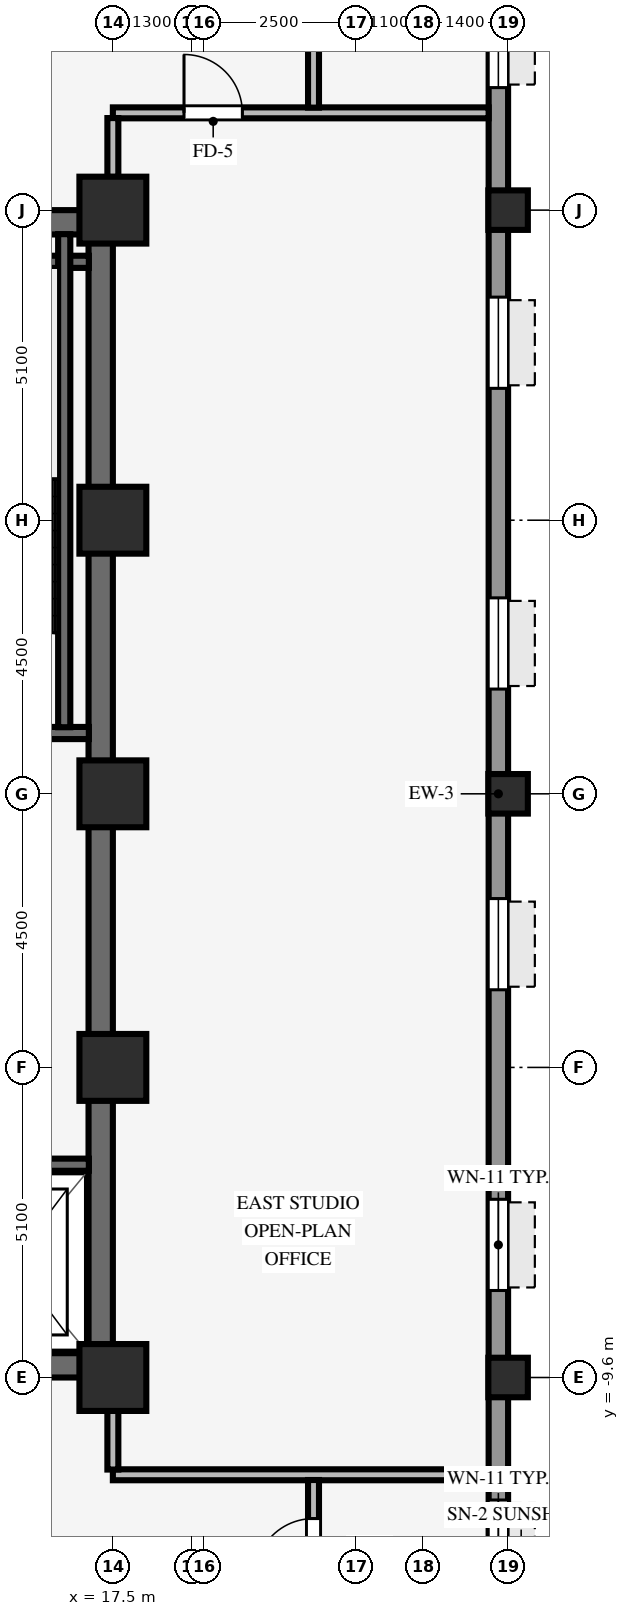
"""IFC4 building model, lengths in metres.
Left out: names, types, materials, properties, quantities, classifications, styles, units other than length and angle.
Written with IfcOpenShell. Run it as: python <this file> out.ifc"""

import sys

from ifc_helpers import new_model, si_unit, direction, frame, frame_2d, origin, origin_2d, place, context, subcontext, project, spatial, rectangle, hollow_rectangle, extrude, source, transform, mapped, element, fill, save


model = new_model("IFC4")
c1 = context("Model", 3, precision=1e-05, world=origin(), true_north=direction((0.0, 1.0)))
c2 = subcontext(c1, "Body", "Model", "MODEL_VIEW")
j1 = project(units=[si_unit("LENGTHUNIT", "METRE"), si_unit("PLANEANGLEUNIT", "RADIAN")], contexts=[c1])
p1 = place(None, origin())
s1 = spatial("IfcSite", under=j1, at=p1, CompositionType="ELEMENT")
p2 = place(p1, origin())
s2 = spatial("IfcBuilding", under=s1, at=p2, CompositionType="ELEMENT")
p3 = place(p2, frame((0.0, 0.0, 101.95)))
s3 = spatial("IfcBuildingStorey", under=s2, at=p3, CompositionType="ELEMENT", Elevation=101.95)
for number, where, z_axis, x_axis in (
    (1, (9.0, -9.4, 0.0), (0.0, 0.0, 1.0), (1.0, 0.0, 0.0)),
    (2, (9.0, 9.4, 0.0), (0.0, 0.0, 1.0), (1.0, 0.0, 0.0)),
):
    element("IfcWall", number, at=place(p3, frame(where, z_axis=z_axis, x_axis=x_axis)), inside=s3, PredefinedType="SHEAR", context=c2, shape_type="SweptSolid", body=[
        extrude(rectangle(XDim=8.5, YDim=0.4, at=frame_2d((4.25, 0.0))), origin(), (0.0, 0.0, 1.0), 3.37),
    ])
p4 = place(p3, frame((17.3, -9.205, 0.0), z_axis=(0.0, 0.0, 1.0), x_axis=(0.0, 1.0, 0.0)))
e3 = element("IfcWall", 3, at=p4, inside=s3, PredefinedType="SHEAR", context=c2, shape_type="SweptSolid", body=[
    extrude(rectangle(XDim=18.41, YDim=0.4, at=frame_2d((9.205, 0.0))), origin(), (0.0, 0.0, 1.0), 3.37),
])
for number, where, z_axis, x_axis in (
    (4, (17.5, -9.6, 0.0), (0.0, 0.0, 1.0), (1.0, 0.0, 0.0)),
    (5, (17.5, -4.5, 0.0), (0.0, 0.0, 1.0), (1.0, 0.0, 0.0)),
    (6, (17.5, 4.5, 0.0), (0.0, 0.0, 1.0), (1.0, 0.0, 0.0)),
    (7, (17.5, 9.6, 0.0), (0.0, 0.0, 1.0), (1.0, 0.0, 0.0)),
    (8, (17.5, 0.0, 0.0), (0.0, 0.0, 1.0), (1.0, 0.0, 0.0)),
):
    element("IfcColumn", number, at=place(p3, frame(where, z_axis=z_axis, x_axis=x_axis)), inside=s3, PredefinedType="COLUMN", context=c2, shape_type="SweptSolid", body=[
        extrude(rectangle(XDim=1.1, YDim=1.1, at=origin_2d()), origin(), (0.0, 0.0, 1.0), 3.37),
    ])
for number, where, z_axis, x_axis in (
    (9, (24.0, -9.6, 0.0), (0.0, 0.0, 1.0), (1.0, 0.0, 0.0)),
    (10, (24.0, 0.0, 0.0), (0.0, 0.0, 1.0), (1.0, 0.0, 0.0)),
    (11, (24.0, 9.6, 0.0), (0.0, 0.0, 1.0), (1.0, 0.0, 0.0)),
):
    element("IfcColumn", number, at=place(p3, frame(where, z_axis=z_axis, x_axis=x_axis)), inside=s3, PredefinedType="COLUMN", context=c2, shape_type="SweptSolid", body=[
        extrude(hollow_rectangle(XDim=0.65, YDim=0.65, WallThickness=0.04, InnerFilletRadius=0.04, OuterFilletRadius=0.08, at=origin_2d()), origin(), (0.0, 0.0, 1.0), 3.37),
    ])
p5 = place(p3, frame((23.84, -20.784, 0.0), z_axis=(0.0, 0.0, 1.0), x_axis=(0.0, 1.0, 0.0)))
e12 = element("IfcWall", 12, at=p5, inside=s3, PredefinedType="STANDARD", context=c2, shape_type="SweptSolid", body=[
    extrude(rectangle(XDim=41.568, YDim=0.32, at=frame_2d((20.784, 0.0))), origin(), (0.0, 0.0, 1.0), 2.705),
])
p6 = place(p5, frame((1.373, 0.0, 0.8)))
e13 = element("IfcOpeningElement", 13, at=p6, cuts=e12, PredefinedType="OPENING", context=c2, shape_type="SweptSolid", body=[
    extrude(rectangle(XDim=1.5, YDim=1.6, at=frame_2d((0.75, 0.8))), frame((0.0, 0.17, 0.0), z_axis=(0.0, -1.0, 0.0), x_axis=(1.0, 0.0, 0.0)), (0.0, 0.0, 1.0), 0.34),
])
p7 = place(p5, frame((7.669, 0.0, 0.8)))
e14 = element("IfcOpeningElement", 14, at=p7, cuts=e12, PredefinedType="OPENING", context=c2, shape_type="SweptSolid", body=[
    extrude(rectangle(XDim=1.5, YDim=1.6, at=frame_2d((0.75, 0.8))), frame((0.0, 0.17, 0.0), z_axis=(0.0, -1.0, 0.0), x_axis=(1.0, 0.0, 0.0)), (0.0, 0.0, 1.0), 0.34),
])
p8 = place(p5, frame((12.615, 0.0, 0.8)))
e15 = element("IfcOpeningElement", 15, at=p8, cuts=e12, PredefinedType="OPENING", context=c2, shape_type="SweptSolid", body=[
    extrude(rectangle(XDim=1.5, YDim=1.6, at=frame_2d((0.75, 0.8))), frame((0.0, 0.17, 0.0), z_axis=(0.0, -1.0, 0.0), x_axis=(1.0, 0.0, 0.0)), (0.0, 0.0, 1.0), 0.34),
])
p9 = place(p5, frame((17.561, 0.0, 0.8)))
e16 = element("IfcOpeningElement", 16, at=p9, cuts=e12, PredefinedType="OPENING", context=c2, shape_type="SweptSolid", body=[
    extrude(rectangle(XDim=1.5, YDim=1.6, at=frame_2d((0.75, 0.8))), frame((0.0, 0.17, 0.0), z_axis=(0.0, -1.0, 0.0), x_axis=(1.0, 0.0, 0.0)), (0.0, 0.0, 1.0), 0.34),
])
p10 = place(p5, frame((22.507, 0.0, 0.8)))
e17 = element("IfcOpeningElement", 17, at=p10, cuts=e12, PredefinedType="OPENING", context=c2, shape_type="SweptSolid", body=[
    extrude(rectangle(XDim=1.5, YDim=1.6, at=frame_2d((0.75, 0.8))), frame((0.0, 0.17, 0.0), z_axis=(0.0, -1.0, 0.0), x_axis=(1.0, 0.0, 0.0)), (0.0, 0.0, 1.0), 0.34),
])
p11 = place(p5, frame((27.453, 0.0, 0.8)))
e18 = element("IfcOpeningElement", 18, at=p11, cuts=e12, PredefinedType="OPENING", context=c2, shape_type="SweptSolid", body=[
    extrude(rectangle(XDim=1.5, YDim=1.6, at=frame_2d((0.75, 0.8))), frame((0.0, 0.17, 0.0), z_axis=(0.0, -1.0, 0.0), x_axis=(1.0, 0.0, 0.0)), (0.0, 0.0, 1.0), 0.34),
])
p12 = place(p5, frame((32.399, 0.0, 0.8)))
e19 = element("IfcOpeningElement", 19, at=p12, cuts=e12, PredefinedType="OPENING", context=c2, shape_type="SweptSolid", body=[
    extrude(rectangle(XDim=1.5, YDim=1.6, at=frame_2d((0.75, 0.8))), frame((0.0, 0.17, 0.0), z_axis=(0.0, -1.0, 0.0), x_axis=(1.0, 0.0, 0.0)), (0.0, 0.0, 1.0), 0.34),
])
p13 = place(p5, frame((38.695, 0.0, 0.8)))
e20 = element("IfcOpeningElement", 20, at=p13, cuts=e12, PredefinedType="OPENING", context=c2, shape_type="SweptSolid", body=[
    extrude(rectangle(XDim=1.5, YDim=1.6, at=frame_2d((0.75, 0.8))), frame((0.0, 0.17, 0.0), z_axis=(0.0, -1.0, 0.0), x_axis=(1.0, 0.0, 0.0)), (0.0, 0.0, 1.0), 0.34),
])
for number, where, z_axis, x_axis in (
    (21, (13.535, 1.0, 0.0), (0.0, 0.0, 1.0), (1.0, 0.0, 0.0)),
    (22, (13.535, 8.75, 0.0), (0.0, 0.0, 1.0), (1.0, 0.0, 0.0)),
):
    element("IfcWall", number, at=place(p3, frame(where, z_axis=z_axis, x_axis=x_axis)), inside=s3, PredefinedType="SHEAR", context=c2, shape_type="SweptSolid", body=[
        extrude(rectangle(XDim=3.57, YDim=0.2, at=frame_2d((1.785, 0.0))), origin(), (0.0, 0.0, 1.0), 3.37),
    ])
p14 = place(p3, frame((16.7, 1.095, 0.0), z_axis=(0.0, 0.0, 1.0), x_axis=(0.0, 1.0, 0.0)))
e23 = element("IfcWall", 23, at=p14, inside=s3, PredefinedType="SHEAR", context=c2, shape_type="SweptSolid", body=[
    extrude(rectangle(XDim=8.11, YDim=0.2, at=frame_2d((4.055, 0.0))), origin(), (0.0, 0.0, 1.0), 3.37),
])
p15 = place(p3, frame((14.645, -6.1, 0.0), z_axis=(0.0, 0.0, 1.0), x_axis=(1.0, 0.0, 0.0)))
e24 = element("IfcWall", 24, at=p15, inside=s3, PredefinedType="SHEAR", context=c2, shape_type="SweptSolid", body=[
    extrude(rectangle(XDim=2.46, YDim=0.2, at=frame_2d((1.23, 0.0))), origin(), (0.0, 0.0, 1.0), 3.37),
])
p16 = place(p3, frame((17.5, -11.2, 0.0), z_axis=(0.0, 0.0, 1.0), x_axis=(1.0, 0.0, 0.0)))
e25 = element("IfcWall", 25, at=p16, inside=s3, PredefinedType="PARTITIONING", context=c2, shape_type="SweptSolid", body=[
    extrude(rectangle(XDim=6.18, YDim=0.18, at=frame_2d((3.09, 0.0))), origin(), (0.0, 0.0, 1.0), 3.36),
])
p17 = place(p3, frame((17.5, 11.2, 0.0), z_axis=(0.0, 0.0, 1.0), x_axis=(1.0, 0.0, 0.0)))
e26 = element("IfcWall", 26, at=p17, inside=s3, PredefinedType="PARTITIONING", context=c2, shape_type="SweptSolid", body=[
    extrude(rectangle(XDim=6.18, YDim=0.18, at=frame_2d((3.09, 0.0))), origin(), (0.0, 0.0, 1.0), 3.36),
])
p18 = place(p17, frame((1.17, 0.0, 0.0)))
e27 = element("IfcOpeningElement", 27, at=p18, cuts=e26, PredefinedType="OPENING", context=c2, shape_type="SweptSolid", body=[
    extrude(rectangle(XDim=0.96, YDim=2.1, at=frame_2d((0.48, 1.05))), frame((0.0, 0.1, 0.0), z_axis=(0.0, -1.0, 0.0), x_axis=(1.0, 0.0, 0.0)), (0.0, 0.0, 1.0), 0.2),
])
for number, where, z_axis, x_axis in (
    (28, (17.5, -11.114, 0.0), (0.0, 0.0, 1.0), (0.0, 1.0, 0.0)),
    (29, (17.5, 10.146, 0.0), (0.0, 0.0, 1.0), (0.0, 1.0, 0.0)),
):
    element("IfcWall", number, at=place(p3, frame(where, z_axis=z_axis, x_axis=x_axis)), inside=s3, PredefinedType="PARTITIONING", context=c2, shape_type="SweptSolid", body=[
        extrude(rectangle(XDim=0.968, YDim=0.18, at=frame_2d((0.484, 0.0))), origin(), (0.0, 0.0, 1.0), 2.738),
    ])
p19 = place(p3, frame((20.8, -13.514, 0.0), z_axis=(0.0, 0.0, 1.0), x_axis=(0.0, 1.0, 0.0)))
e30 = element("IfcWall", 30, at=p19, inside=s3, PredefinedType="PARTITIONING", context=c2, shape_type="SweptSolid", body=[
    extrude(rectangle(XDim=2.228, YDim=0.18, at=frame_2d((1.114, 0.0))), origin(), (0.0, 0.0, 1.0), 3.36),
])
p20 = place(p19, frame((0.634, 0.0, 0.0)))
e31 = element("IfcOpeningElement", 31, at=p20, cuts=e30, PredefinedType="OPENING", context=c2, shape_type="SweptSolid", body=[
    extrude(rectangle(XDim=0.96, YDim=2.1, at=frame_2d((0.48, 1.05))), frame((0.0, 0.1, 0.0), z_axis=(0.0, -1.0, 0.0), x_axis=(1.0, 0.0, 0.0)), (0.0, 0.0, 1.0), 0.2),
])
p21 = place(p3, frame((20.8, 11.286, 0.0), z_axis=(0.0, 0.0, 1.0), x_axis=(0.0, 1.0, 0.0)))
e32 = element("IfcWall", 32, at=p21, inside=s3, PredefinedType="PARTITIONING", context=c2, shape_type="SweptSolid", body=[
    extrude(rectangle(XDim=2.228, YDim=0.18, at=frame_2d((1.114, 0.0))), origin(), (0.0, 0.0, 1.0), 3.36),
])
m1 = source(origin(), c2, "Body", "SweptSolid", [
    extrude(rectangle(XDim=1.5, YDim=1.6, at=frame_2d((0.75, 0.8))), frame((0.0, 0.03, 0.0), z_axis=(0.0, -1.0, 0.0), x_axis=(1.0, 0.0, 0.0)), (0.0, 0.0, 1.0), 0.06),
])
p22 = place(p7, origin())
e33 = element("IfcWindow", 33, at=p22, inside=s3, PartitioningType="SINGLE_PANEL", PredefinedType="WINDOW", context=c2, shape_type="MappedRepresentation", body=[
    mapped(m1, transform((0.0, 0.0, 0.0), scale=1.0)),
])
fill(e14, e33)
p23 = place(p8, origin())
e34 = element("IfcWindow", 34, at=p23, inside=s3, PartitioningType="SINGLE_PANEL", PredefinedType="WINDOW", context=c2, shape_type="MappedRepresentation", body=[
    mapped(m1, transform((0.0, 0.0, 0.0), scale=1.0)),
])
fill(e15, e34)
p24 = place(p9, origin())
e35 = element("IfcWindow", 35, at=p24, inside=s3, PartitioningType="SINGLE_PANEL", PredefinedType="WINDOW", context=c2, shape_type="MappedRepresentation", body=[
    mapped(m1, transform((0.0, 0.0, 0.0), scale=1.0)),
])
fill(e16, e35)
p25 = place(p10, origin())
e36 = element("IfcWindow", 36, at=p25, inside=s3, PartitioningType="SINGLE_PANEL", PredefinedType="WINDOW", context=c2, shape_type="MappedRepresentation", body=[
    mapped(m1, transform((0.0, 0.0, 0.0), scale=1.0)),
])
fill(e17, e36)
p26 = place(p11, origin())
e37 = element("IfcWindow", 37, at=p26, inside=s3, PartitioningType="SINGLE_PANEL", PredefinedType="WINDOW", context=c2, shape_type="MappedRepresentation", body=[
    mapped(m1, transform((0.0, 0.0, 0.0), scale=1.0)),
])
fill(e18, e37)
p27 = place(p12, origin())
e38 = element("IfcWindow", 38, at=p27, inside=s3, PartitioningType="SINGLE_PANEL", PredefinedType="WINDOW", context=c2, shape_type="MappedRepresentation", body=[
    mapped(m1, transform((0.0, 0.0, 0.0), scale=1.0)),
])
fill(e19, e38)
m2 = source(origin(), c2, "Body", "SweptSolid", [
    extrude(rectangle(XDim=0.96, YDim=2.1, at=frame_2d((0.48, 1.05))), frame((0.0, 0.025, 0.0), z_axis=(0.0, -1.0, 0.0), x_axis=(1.0, 0.0, 0.0)), (0.0, 0.0, 1.0), 0.05),
])
p28 = place(p18, origin())
e39 = element("IfcDoor", 39, at=p28, inside=s3, OperationType="SINGLE_SWING_LEFT", PredefinedType="DOOR", context=c2, shape_type="MappedRepresentation", body=[
    mapped(m2, transform((0.0, 0.0, 0.0), scale=1.0)),
])
fill(e27, e39)
p29 = place(p20, origin())
e40 = element("IfcDoor", 40, at=p29, inside=s3, OperationType="SINGLE_SWING_LEFT", PredefinedType="DOOR", context=c2, shape_type="MappedRepresentation", body=[
    mapped(m2, transform((0.0, 0.0, 0.0), scale=1.0)),
])
fill(e31, e40)
save(model, sys.argv[1])
